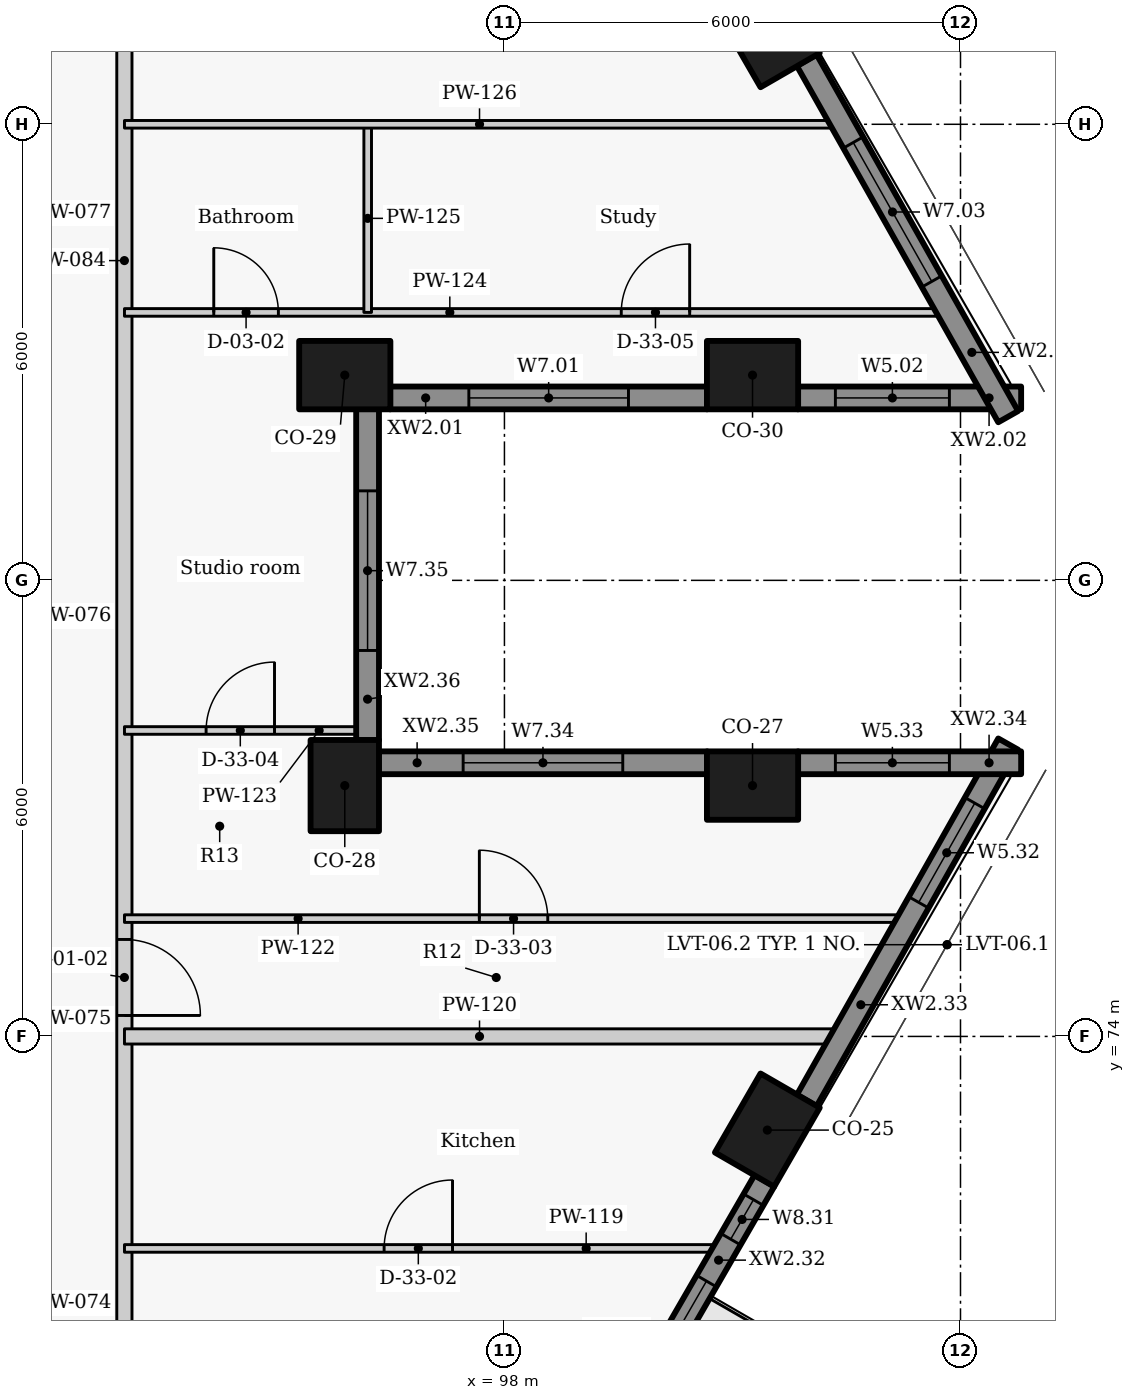
"""IFC4 building model, lengths in metres.
Left out: names, types, materials, properties, quantities, classifications, styles, units other than length and angle.
Written with IfcOpenShell. Run it as: python <this file> out.ifc"""

import sys

from ifc_helpers import new_model, si_unit, direction, frame, frame_2d, origin, origin_2d, place, context, subcontext, project, spatial, rectangle, extrude, element, fill, save


model = new_model("IFC4")
c1 = context("Model", 3, precision=1e-05, world=origin(), true_north=direction((0.0, 1.0)))
c2 = subcontext(c1, "Body", "Model", "MODEL_VIEW")
j1 = project(units=[si_unit("LENGTHUNIT", "METRE"), si_unit("PLANEANGLEUNIT", "RADIAN")], contexts=[c1])
p1 = place(None, origin())
s1 = spatial("IfcSite", under=j1, at=p1, CompositionType="ELEMENT")
p2 = place(p1, origin())
s2 = spatial("IfcBuilding", under=s1, at=p2, CompositionType="ELEMENT")
p3 = place(p2, frame((0.0, 0.0, 203.1)))
s3 = spatial("IfcBuildingStorey", under=s2, at=p3, CompositionType="ELEMENT", Elevation=203.1)
for number, where, z_axis, x_axis in (
    (1, (101.459, 72.768, 0.0), (0.0, 0.0, 1.0), (0.5, 0.866, 0.0)),
    (2, (101.264, 77.3, 0.0), (0.0, 0.0, 1.0), (-1.0, 0.0, 0.0)),
    (3, (95.899, 77.3, 0.0), (0.0, 0.0, 1.0), (0.0, 1.0, 0.0)),
    (4, (95.899, 82.7, 0.0), (0.0, 0.0, 1.0), (1.0, 0.0, 0.0)),
    (5, (101.264, 82.7, 0.0), (0.0, 0.0, 1.0), (1.0, 0.0, 0.0)),
    (6, (101.459, 87.232, 0.0), (0.0, 0.0, 1.0), (-0.5, 0.866, 0.0)),
):
    element("IfcColumn", number, at=place(p3, frame(where, z_axis=z_axis, x_axis=x_axis)), inside=s3, PredefinedType="COLUMN", context=c2, shape_type="SweptSolid", body=[
        extrude(rectangle(XDim=1.2, YDim=0.9, at=origin_2d()), origin(), (0.0, 0.0, 1.0), 3.3),
    ])
p4 = place(p3, frame((96.496, 82.4, 0.0), z_axis=(0.0, 0.0, 1.0), x_axis=(1.0, 0.0, 0.0)))
e7 = element("IfcWall", 7, at=p4, inside=s3, PredefinedType="SOLIDWALL", context=c2, shape_type="SweptSolid", body=[
    extrude(rectangle(XDim=4.172, YDim=0.3, at=frame_2d((2.086, 0.0))), origin(), (0.0, 0.0, 1.0), 2.425),
])
p5 = place(p4, frame((1.036, 0.0, 0.9)))
e8 = element("IfcOpeningElement", 8, at=p5, cuts=e7, PredefinedType="OPENING", context=c2, shape_type="SweptSolid", body=[
    extrude(rectangle(XDim=2.1, YDim=1.1, at=frame_2d((1.05, 0.55))), frame((0.0, 0.16, 0.0), z_axis=(0.0, -1.0, 0.0), x_axis=(1.0, 0.0, 0.0)), (0.0, 0.0, 1.0), 0.32),
])
p6 = place(p3, frame((101.86, 82.4, 0.0), z_axis=(0.0, 0.0, 1.0), x_axis=(1.0, 0.0, 0.0)))
e9 = element("IfcWall", 9, at=p6, inside=s3, PredefinedType="SOLIDWALL", context=c2, shape_type="SweptSolid", body=[
    extrude(rectangle(XDim=2.938, YDim=0.3, at=frame_2d((1.469, 0.0))), origin(), (0.0, 0.0, 1.0), 2.425),
])
p7 = place(p6, frame((0.494, 0.0, 0.9)))
e10 = element("IfcOpeningElement", 10, at=p7, cuts=e9, PredefinedType="OPENING", context=c2, shape_type="SweptSolid", body=[
    extrude(rectangle(XDim=1.5, YDim=1.1, at=frame_2d((0.75, 0.55))), frame((0.0, 0.16, 0.0), z_axis=(0.0, -1.0, 0.0), x_axis=(1.0, 0.0, 0.0)), (0.0, 0.0, 1.0), 0.32),
])
p8 = place(p3, frame((104.627, 82.154, 0.0), z_axis=(0.0, 0.0, 1.0), x_axis=(-0.492033360928, 0.870576344575, 0.0)))
e11 = element("IfcWall", 11, at=p8, inside=s3, PredefinedType="SOLIDWALL", context=c2, shape_type="SweptSolid", body=[
    extrude(rectangle(XDim=5.387, YDim=0.3, at=frame_2d((2.693, 0.0))), origin(), (0.0, 0.0, 1.0), 2.425),
])
p9 = place(p8, frame((2.043, 0.0, 0.9)))
e12 = element("IfcOpeningElement", 12, at=p9, cuts=e11, PredefinedType="OPENING", context=c2, shape_type="SweptSolid", body=[
    extrude(rectangle(XDim=2.1, YDim=1.1, at=frame_2d((1.05, 0.55))), frame((0.0, 0.16, 0.0), z_axis=(0.0, -1.0, 0.0), x_axis=(1.0, 0.0, 0.0)), (0.0, 0.0, 1.0), 0.32),
])
p10 = place(p3, frame((99.697, 69.116, 0.0), z_axis=(0.0, 0.0, 1.0), x_axis=(0.499955427682, 0.866051136095, 0.0)))
e13 = element("IfcWall", 13, at=p10, inside=s3, PredefinedType="SOLIDWALL", context=c2, shape_type="SweptSolid", body=[
    extrude(rectangle(XDim=3.447, YDim=0.3, at=frame_2d((1.724, 0.0))), origin(), (0.0, 0.0, 1.0), 2.425),
])
p11 = place(p10, frame((0.422, 0.0, 0.9)))
e14 = element("IfcOpeningElement", 14, at=p11, cuts=e13, PredefinedType="OPENING", context=c2, shape_type="SweptSolid", body=[
    extrude(rectangle(XDim=1.5, YDim=1.1, at=frame_2d((0.75, 0.55))), frame((0.0, 0.16, 0.0), z_axis=(0.0, -1.0, 0.0), x_axis=(1.0, 0.0, 0.0)), (0.0, 0.0, 1.0), 0.32),
])
p12 = place(p10, frame((2.559, 0.0, 0.9)))
e15 = element("IfcOpeningElement", 15, at=p12, cuts=e13, PredefinedType="OPENING", context=c2, shape_type="SweptSolid", body=[
    extrude(rectangle(XDim=0.6, YDim=1.1, at=frame_2d((0.3, 0.55))), frame((0.0, 0.16, 0.0), z_axis=(0.0, -1.0, 0.0), x_axis=(1.0, 0.0, 0.0)), (0.0, 0.0, 1.0), 0.32),
])
p13 = place(p3, frame((101.977, 73.157, 0.0), z_axis=(0.0, 0.0, 1.0), x_axis=(0.492033360928, 0.870576344575, 0.0)))
e16 = element("IfcWall", 16, at=p13, inside=s3, PredefinedType="SOLIDWALL", context=c2, shape_type="SweptSolid", body=[
    extrude(rectangle(XDim=5.387, YDim=0.3, at=frame_2d((2.693, 0.0))), origin(), (0.0, 0.0, 1.0), 2.425),
])
p14 = place(p13, frame((2.994, 0.0, 0.9)))
e17 = element("IfcOpeningElement", 17, at=p14, cuts=e16, PredefinedType="OPENING", context=c2, shape_type="SweptSolid", body=[
    extrude(rectangle(XDim=1.5, YDim=1.1, at=frame_2d((0.75, 0.55))), frame((0.0, 0.16, 0.0), z_axis=(0.0, -1.0, 0.0), x_axis=(1.0, 0.0, 0.0)), (0.0, 0.0, 1.0), 0.32),
])
p15 = place(p3, frame((104.798, 77.6, 0.0), z_axis=(0.0, 0.0, 1.0), x_axis=(-1.0, 0.0, 0.0)))
e18 = element("IfcWall", 18, at=p15, inside=s3, PredefinedType="SOLIDWALL", context=c2, shape_type="SweptSolid", body=[
    extrude(rectangle(XDim=2.938, YDim=0.3, at=frame_2d((1.469, 0.0))), origin(), (0.0, 0.0, 1.0), 2.425),
])
p16 = place(p15, frame((0.944, 0.0, 0.9)))
e19 = element("IfcOpeningElement", 19, at=p16, cuts=e18, PredefinedType="OPENING", context=c2, shape_type="SweptSolid", body=[
    extrude(rectangle(XDim=1.5, YDim=1.1, at=frame_2d((0.75, 0.55))), frame((0.0, 0.16, 0.0), z_axis=(0.0, -1.0, 0.0), x_axis=(1.0, 0.0, 0.0)), (0.0, 0.0, 1.0), 0.32),
])
p17 = place(p3, frame((100.668, 77.6, 0.0), z_axis=(0.0, 0.0, 1.0), x_axis=(-1.0, 0.0, 0.0)))
e20 = element("IfcWall", 20, at=p17, inside=s3, PredefinedType="SOLIDWALL", context=c2, shape_type="SweptSolid", body=[
    extrude(rectangle(XDim=4.323, YDim=0.3, at=frame_2d((2.161, 0.0))), origin(), (0.0, 0.0, 1.0), 2.425),
])
p18 = place(p17, frame((1.111, 0.0, 0.9)))
e21 = element("IfcOpeningElement", 21, at=p18, cuts=e20, PredefinedType="OPENING", context=c2, shape_type="SweptSolid", body=[
    extrude(rectangle(XDim=2.1, YDim=1.1, at=frame_2d((1.05, 0.55))), frame((0.0, 0.16, 0.0), z_axis=(0.0, -1.0, 0.0), x_axis=(1.0, 0.0, 0.0)), (0.0, 0.0, 1.0), 0.32),
])
p19 = place(p3, frame((96.199, 77.896, 0.0), z_axis=(0.0, 0.0, 1.0), x_axis=(0.0, 1.0, 0.0)))
e22 = element("IfcWall", 22, at=p19, inside=s3, PredefinedType="SOLIDWALL", context=c2, shape_type="SweptSolid", body=[
    extrude(rectangle(XDim=4.358, YDim=0.3, at=frame_2d((2.179, 0.0))), origin(), (0.0, 0.0, 1.0), 2.425),
])
p20 = place(p19, frame((1.181, 0.0, 0.9)))
e23 = element("IfcOpeningElement", 23, at=p20, cuts=e22, PredefinedType="OPENING", context=c2, shape_type="SweptSolid", body=[
    extrude(rectangle(XDim=2.1, YDim=1.1, at=frame_2d((1.05, 0.55))), frame((0.0, 0.16, 0.0), z_axis=(0.0, -1.0, 0.0), x_axis=(1.0, 0.0, 0.0)), (0.0, 0.0, 1.0), 0.32),
])
p21 = place(p3, frame((93.0, 101.281, 0.0), z_axis=(0.0, 0.0, 1.0), x_axis=(0.0, -1.0, 0.0)))
e24 = element("IfcWall", 24, at=p21, inside=s3, PredefinedType="PARTITIONING", context=c2, shape_type="SweptSolid", body=[
    extrude(rectangle(XDim=42.606, YDim=0.2, at=frame_2d((21.303, 0.0))), origin(), (0.0, 0.0, 1.0), 2.405),
])
p22 = place(p21, frame((39.33, 0.0, 0.0)))
e25 = element("IfcOpeningElement", 25, at=p22, cuts=e24, PredefinedType="OPENING", context=c2, shape_type="SweptSolid", body=[
    extrude(rectangle(XDim=1.0, YDim=2.1, at=frame_2d((0.5, 1.05))), frame((0.0, 0.11, 0.0), z_axis=(0.0, -1.0, 0.0), x_axis=(1.0, 0.0, 0.0)), (0.0, 0.0, 1.0), 0.22),
])
p23 = place(p21, frame((26.005, 0.0, 0.0)))
e26 = element("IfcOpeningElement", 26, at=p23, cuts=e24, PredefinedType="OPENING", context=c2, shape_type="SweptSolid", body=[
    extrude(rectangle(XDim=1.0, YDim=2.1, at=frame_2d((0.5, 1.05))), frame((0.0, 0.11, 0.0), z_axis=(0.0, -1.0, 0.0), x_axis=(1.0, 0.0, 0.0)), (0.0, 0.0, 1.0), 0.22),
])
p24 = place(p21, frame((7.143, 0.0, 0.0)))
e27 = element("IfcOpeningElement", 27, at=p24, cuts=e24, PredefinedType="OPENING", context=c2, shape_type="SweptSolid", body=[
    extrude(rectangle(XDim=1.0, YDim=2.1, at=frame_2d((0.5, 1.05))), frame((0.0, 0.11, 0.0), z_axis=(0.0, -1.0, 0.0), x_axis=(1.0, 0.0, 0.0)), (0.0, 0.0, 1.0), 0.22),
])
p25 = place(p3, frame((93.001, 71.211, 0.0), z_axis=(0.0, 0.0, 1.0), x_axis=(1.0, 0.0, 0.0)))
e28 = element("IfcWall", 28, at=p25, inside=s3, PredefinedType="PARTITIONING", context=c2, shape_type="SweptSolid", body=[
    extrude(rectangle(XDim=7.732, YDim=0.1, at=frame_2d((3.866, 0.0))), origin(), (0.0, 0.0, 1.0), 2.405),
])
p26 = place(p25, frame((3.416, 0.0, 0.0)))
e29 = element("IfcOpeningElement", 29, at=p26, cuts=e28, PredefinedType="OPENING", context=c2, shape_type="SweptSolid", body=[
    extrude(rectangle(XDim=0.9, YDim=2.1, at=frame_2d((0.45, 1.05))), frame((0.0, 0.06, 0.0), z_axis=(0.0, -1.0, 0.0), x_axis=(1.0, 0.0, 0.0)), (0.0, 0.0, 1.0), 0.12),
])
p27 = place(p3, frame((93.001, 74.0, 0.0), z_axis=(0.0, 0.0, 1.0), x_axis=(1.0, 0.0, 0.0)))
e30 = element("IfcWall", 30, at=p27, inside=s3, PredefinedType="PARTITIONING", context=c2, shape_type="SweptSolid", body=[
    extrude(rectangle(XDim=9.343, YDim=0.2, at=frame_2d((4.671, 0.0))), origin(), (0.0, 0.0, 1.0), 2.405),
])
p28 = place(p3, frame((93.001, 75.55, 0.0), z_axis=(0.0, 0.0, 1.0), x_axis=(1.0, 0.0, 0.0)))
e31 = element("IfcWall", 31, at=p28, inside=s3, PredefinedType="PARTITIONING", context=c2, shape_type="SweptSolid", body=[
    extrude(rectangle(XDim=10.237, YDim=0.1, at=frame_2d((5.119, 0.0))), origin(), (0.0, 0.0, 1.0), 2.405),
])
p29 = place(p28, frame((4.669, 0.0, 0.0)))
e32 = element("IfcOpeningElement", 32, at=p29, cuts=e31, PredefinedType="OPENING", context=c2, shape_type="SweptSolid", body=[
    extrude(rectangle(XDim=0.9, YDim=2.1, at=frame_2d((0.45, 1.05))), frame((0.0, 0.06, 0.0), z_axis=(0.0, -1.0, 0.0), x_axis=(1.0, 0.0, 0.0)), (0.0, 0.0, 1.0), 0.12),
])
p30 = place(p3, frame((93.001, 78.025, 0.0), z_axis=(0.0, 0.0, 1.0), x_axis=(1.0, 0.0, 0.0)))
e33 = element("IfcWall", 33, at=p30, inside=s3, PredefinedType="PARTITIONING", context=c2, shape_type="SweptSolid", body=[
    extrude(rectangle(XDim=3.049, YDim=0.1, at=frame_2d((1.524, 0.0))), origin(), (0.0, 0.0, 1.0), 2.405),
])
p31 = place(p30, frame((1.074, 0.0, 0.0)))
e34 = element("IfcOpeningElement", 34, at=p31, cuts=e33, PredefinedType="OPENING", context=c2, shape_type="SweptSolid", body=[
    extrude(rectangle(XDim=0.9, YDim=2.1, at=frame_2d((0.45, 1.05))), frame((0.0, 0.06, 0.0), z_axis=(0.0, -1.0, 0.0), x_axis=(1.0, 0.0, 0.0)), (0.0, 0.0, 1.0), 0.12),
])
p32 = place(p3, frame((93.001, 83.525, 0.0), z_axis=(0.0, 0.0, 1.0), x_axis=(1.0, 0.0, 0.0)))
e35 = element("IfcWall", 35, at=p32, inside=s3, PredefinedType="PARTITIONING", context=c2, shape_type="SweptSolid", body=[
    extrude(rectangle(XDim=10.771, YDim=0.1, at=frame_2d((5.386, 0.0))), origin(), (0.0, 0.0, 1.0), 2.405),
])
p33 = place(p32, frame((1.175, 0.0, 0.0)))
e36 = element("IfcOpeningElement", 36, at=p33, cuts=e35, PredefinedType="OPENING", context=c2, shape_type="SweptSolid", body=[
    extrude(rectangle(XDim=0.85, YDim=2.1, at=frame_2d((0.425, 1.05))), frame((0.0, 0.06, 0.0), z_axis=(0.0, -1.0, 0.0), x_axis=(1.0, 0.0, 0.0)), (0.0, 0.0, 1.0), 0.12),
])
p34 = place(p32, frame((6.536, 0.0, 0.0)))
e37 = element("IfcOpeningElement", 37, at=p34, cuts=e35, PredefinedType="OPENING", context=c2, shape_type="SweptSolid", body=[
    extrude(rectangle(XDim=0.9, YDim=2.1, at=frame_2d((0.45, 1.05))), frame((0.0, 0.06, 0.0), z_axis=(0.0, -1.0, 0.0), x_axis=(1.0, 0.0, 0.0)), (0.0, 0.0, 1.0), 0.12),
])
p35 = place(p3, frame((96.201, 83.525, 0.0), z_axis=(0.0, 0.0, 1.0), x_axis=(0.0, 1.0, 0.0)))
e38 = element("IfcWall", 38, at=p35, inside=s3, PredefinedType="PARTITIONING", context=c2, shape_type="SweptSolid", body=[
    extrude(rectangle(XDim=2.475, YDim=0.1, at=frame_2d((1.238, 0.0))), origin(), (0.0, 0.0, 1.0), 3.025),
])
p36 = place(p3, frame((93.001, 86.0, 0.0), z_axis=(0.0, 0.0, 1.0), x_axis=(1.0, 0.0, 0.0)))
e39 = element("IfcWall", 39, at=p36, inside=s3, PredefinedType="PARTITIONING", context=c2, shape_type="SweptSolid", body=[
    extrude(rectangle(XDim=9.342, YDim=0.1, at=frame_2d((4.671, 0.0))), origin(), (0.0, 0.0, 1.0), 2.405),
])
p37 = place(p5, origin())
e40 = element("IfcWindow", 40, at=p37, inside=s3, PartitioningType="SINGLE_PANEL", PredefinedType="WINDOW", context=c2, shape_type="SweptSolid", body=[
    extrude(rectangle(XDim=2.1, YDim=1.1, at=frame_2d((1.05, 0.55))), frame((0.0, 0.03, 0.0), z_axis=(0.0, -1.0, 0.0), x_axis=(1.0, 0.0, 0.0)), (0.0, 0.0, 1.0), 0.06),
])
fill(e8, e40)
p38 = place(p7, origin())
e41 = element("IfcWindow", 41, at=p38, inside=s3, PartitioningType="SINGLE_PANEL", PredefinedType="WINDOW", context=c2, shape_type="SweptSolid", body=[
    extrude(rectangle(XDim=1.5, YDim=1.1, at=frame_2d((0.75, 0.55))), frame((0.0, 0.03, 0.0), z_axis=(0.0, -1.0, 0.0), x_axis=(1.0, 0.0, 0.0)), (0.0, 0.0, 1.0), 0.06),
])
fill(e10, e41)
p39 = place(p9, origin())
e42 = element("IfcWindow", 42, at=p39, inside=s3, PartitioningType="SINGLE_PANEL", PredefinedType="WINDOW", context=c2, shape_type="SweptSolid", body=[
    extrude(rectangle(XDim=2.1, YDim=1.1, at=frame_2d((1.05, 0.55))), frame((0.0, 0.03, 0.0), z_axis=(0.0, -1.0, 0.0), x_axis=(1.0, 0.0, 0.0)), (0.0, 0.0, 1.0), 0.06),
])
fill(e12, e42)
p40 = place(p11, origin())
e43 = element("IfcWindow", 43, at=p40, inside=s3, PartitioningType="SINGLE_PANEL", PredefinedType="WINDOW", context=c2, shape_type="SweptSolid", body=[
    extrude(rectangle(XDim=1.5, YDim=1.1, at=frame_2d((0.75, 0.55))), frame((0.0, 0.03, 0.0), z_axis=(0.0, -1.0, 0.0), x_axis=(1.0, 0.0, 0.0)), (0.0, 0.0, 1.0), 0.06),
])
fill(e14, e43)
p41 = place(p12, origin())
e44 = element("IfcWindow", 44, at=p41, inside=s3, PartitioningType="SINGLE_PANEL", PredefinedType="WINDOW", context=c2, shape_type="SweptSolid", body=[
    extrude(rectangle(XDim=0.6, YDim=1.1, at=frame_2d((0.3, 0.55))), frame((0.0, 0.03, 0.0), z_axis=(0.0, -1.0, 0.0), x_axis=(1.0, 0.0, 0.0)), (0.0, 0.0, 1.0), 0.06),
])
fill(e15, e44)
p42 = place(p14, origin())
e45 = element("IfcWindow", 45, at=p42, inside=s3, PartitioningType="SINGLE_PANEL", PredefinedType="WINDOW", context=c2, shape_type="SweptSolid", body=[
    extrude(rectangle(XDim=1.5, YDim=1.1, at=frame_2d((0.75, 0.55))), frame((0.0, 0.03, 0.0), z_axis=(0.0, -1.0, 0.0), x_axis=(1.0, 0.0, 0.0)), (0.0, 0.0, 1.0), 0.06),
])
fill(e17, e45)
p43 = place(p16, origin())
e46 = element("IfcWindow", 46, at=p43, inside=s3, PartitioningType="SINGLE_PANEL", PredefinedType="WINDOW", context=c2, shape_type="SweptSolid", body=[
    extrude(rectangle(XDim=1.5, YDim=1.1, at=frame_2d((0.75, 0.55))), frame((0.0, 0.03, 0.0), z_axis=(0.0, -1.0, 0.0), x_axis=(1.0, 0.0, 0.0)), (0.0, 0.0, 1.0), 0.06),
])
fill(e19, e46)
p44 = place(p18, origin())
e47 = element("IfcWindow", 47, at=p44, inside=s3, PartitioningType="SINGLE_PANEL", PredefinedType="WINDOW", context=c2, shape_type="SweptSolid", body=[
    extrude(rectangle(XDim=2.1, YDim=1.1, at=frame_2d((1.05, 0.55))), frame((0.0, 0.03, 0.0), z_axis=(0.0, -1.0, 0.0), x_axis=(1.0, 0.0, 0.0)), (0.0, 0.0, 1.0), 0.06),
])
fill(e21, e47)
p45 = place(p20, origin())
e48 = element("IfcWindow", 48, at=p45, inside=s3, PartitioningType="SINGLE_PANEL", PredefinedType="WINDOW", context=c2, shape_type="SweptSolid", body=[
    extrude(rectangle(XDim=2.1, YDim=1.1, at=frame_2d((1.05, 0.55))), frame((0.0, 0.03, 0.0), z_axis=(0.0, -1.0, 0.0), x_axis=(1.0, 0.0, 0.0)), (0.0, 0.0, 1.0), 0.06),
])
fill(e23, e48)
p46 = place(p26, origin())
e49 = element("IfcDoor", 49, at=p46, inside=s3, OperationType="SINGLE_SWING_RIGHT", PredefinedType="DOOR", context=c2, shape_type="SweptSolid", body=[
    extrude(rectangle(XDim=0.9, YDim=2.1, at=frame_2d((0.45, 1.05))), frame((0.0, 0.025, 0.0), z_axis=(0.0, -1.0, 0.0), x_axis=(1.0, 0.0, 0.0)), (0.0, 0.0, 1.0), 0.05),
])
fill(e29, e49)
p47 = place(p23, origin())
e50 = element("IfcDoor", 50, at=p47, inside=s3, OperationType="SINGLE_SWING_RIGHT", PredefinedType="DOOR", context=c2, shape_type="SweptSolid", body=[
    extrude(rectangle(XDim=1.0, YDim=2.1, at=frame_2d((0.5, 1.05))), frame((0.0, 0.025, 0.0), z_axis=(0.0, -1.0, 0.0), x_axis=(1.0, 0.0, 0.0)), (0.0, 0.0, 1.0), 0.05),
])
fill(e26, e50)
p48 = place(p29, origin())
e51 = element("IfcDoor", 51, at=p48, inside=s3, OperationType="SINGLE_SWING_LEFT", PredefinedType="DOOR", context=c2, shape_type="SweptSolid", body=[
    extrude(rectangle(XDim=0.9, YDim=2.1, at=frame_2d((0.45, 1.05))), frame((0.0, 0.025, 0.0), z_axis=(0.0, -1.0, 0.0), x_axis=(1.0, 0.0, 0.0)), (0.0, 0.0, 1.0), 0.05),
])
fill(e32, e51)
p49 = place(p31, origin())
e52 = element("IfcDoor", 52, at=p49, inside=s3, OperationType="SINGLE_SWING_RIGHT", PredefinedType="DOOR", context=c2, shape_type="SweptSolid", body=[
    extrude(rectangle(XDim=0.9, YDim=2.1, at=frame_2d((0.45, 1.05))), frame((0.0, 0.025, 0.0), z_axis=(0.0, -1.0, 0.0), x_axis=(1.0, 0.0, 0.0)), (0.0, 0.0, 1.0), 0.05),
])
fill(e34, e52)
p50 = place(p33, origin())
e53 = element("IfcDoor", 53, at=p50, inside=s3, OperationType="SINGLE_SWING_LEFT", PredefinedType="DOOR", context=c2, shape_type="SweptSolid", body=[
    extrude(rectangle(XDim=0.85, YDim=2.1, at=frame_2d((0.425, 1.05))), frame((0.0, 0.025, 0.0), z_axis=(0.0, -1.0, 0.0), x_axis=(1.0, 0.0, 0.0)), (0.0, 0.0, 1.0), 0.05),
])
fill(e36, e53)
p51 = place(p34, origin())
e54 = element("IfcDoor", 54, at=p51, inside=s3, OperationType="SINGLE_SWING_RIGHT", PredefinedType="DOOR", context=c2, shape_type="SweptSolid", body=[
    extrude(rectangle(XDim=0.9, YDim=2.1, at=frame_2d((0.45, 1.05))), frame((0.0, 0.025, 0.0), z_axis=(0.0, -1.0, 0.0), x_axis=(1.0, 0.0, 0.0)), (0.0, 0.0, 1.0), 0.05),
])
fill(e37, e54)
save(model, sys.argv[1])
